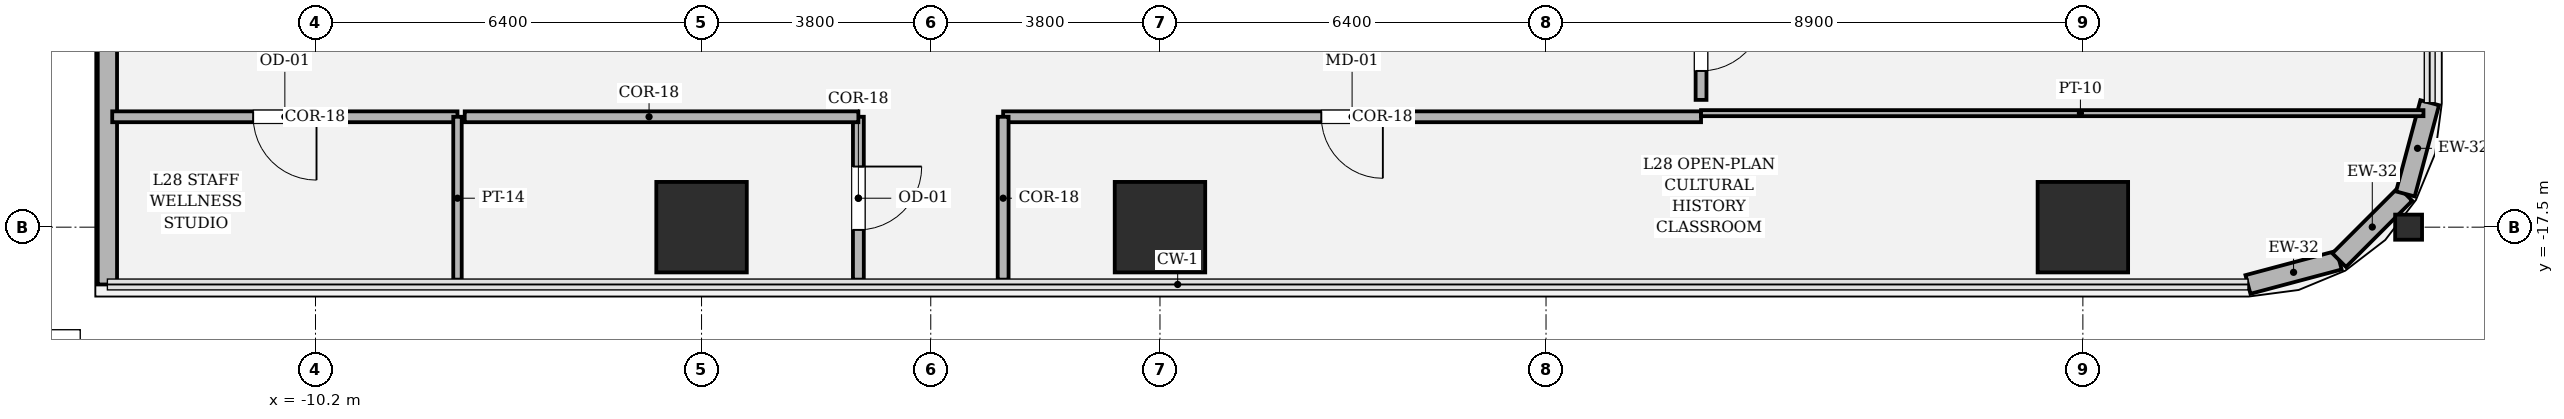
"""IFC4 building model, lengths in metres.
Left out: names, types, materials, properties, quantities, classifications, styles, units other than length and angle.
Written with IfcOpenShell. Run it as: python <this file> out.ifc"""

import sys

from ifc_helpers import new_model, si_unit, direction, frame, frame_2d, origin, origin_2d, place, context, subcontext, project, spatial, rectangle, hollow_rectangle, i_section, extrude, element, fill, save


model = new_model("IFC4")
c1 = context("Model", 3, precision=1e-05, world=origin(), true_north=direction((0.0, 1.0)))
c2 = subcontext(c1, "Body", "Model", "MODEL_VIEW")
j1 = project(units=[si_unit("LENGTHUNIT", "METRE"), si_unit("PLANEANGLEUNIT", "RADIAN")], contexts=[c1])
p1 = place(None, origin())
s1 = spatial("IfcSite", under=j1, at=p1, CompositionType="ELEMENT")
p2 = place(p1, origin())
s2 = spatial("IfcBuilding", under=s1, at=p2, CompositionType="ELEMENT")
p3 = place(p2, frame((0.0, 0.0, 121.35)))
s3 = spatial("IfcBuildingStorey", under=s2, at=p3, CompositionType="ELEMENT", Elevation=121.35)
for number, where, z_axis, x_axis in (
    (1, (-3.8, -17.5, 0.0), (0.0, 0.0, 1.0), (1.0, 0.0, 0.0)),
    (2, (3.8, -17.5, 0.0), (0.0, 0.0, 1.0), (1.0, 0.0, 0.0)),
    (3, (19.1, -17.5, 0.0), (0.0, 0.0, 1.0), (1.0, 0.0, 0.0)),
):
    element("IfcColumn", number, at=place(p3, frame(where, z_axis=z_axis, x_axis=x_axis)), inside=s3, PredefinedType="COLUMN", context=c2, shape_type="SweptSolid", body=[
        extrude(hollow_rectangle(XDim=1.5, YDim=1.5, WallThickness=0.045, at=origin_2d()), origin(), (0.0, 0.0, 1.0), 4.05),
    ])
p4 = place(p3, frame((24.5, -17.5, 0.0), z_axis=(0.0, 0.0, 1.0), x_axis=(0.0, 1.0, 0.0)))
e4 = element("IfcColumn", 4, at=p4, inside=s3, PredefinedType="COLUMN", context=c2, shape_type="SweptSolid", body=[
    extrude(i_section(OverallWidth=0.416, OverallDepth=0.446, WebThickness=0.039, FlangeThickness=0.062, FilletRadius=0.018, at=origin_2d()), origin(), (0.0, 0.0, 1.0), 4.048),
])
p5 = place(p3, frame((21.837, -18.45, 0.0), z_axis=(0.0, 0.0, 1.0), x_axis=(0.966224582397, 0.257701486942, 0.0)))
e5 = element("IfcWall", 5, at=p5, inside=s3, PredefinedType="SOLIDWALL", context=c2, shape_type="SweptSolid", body=[
    extrude(rectangle(XDim=1.565, YDim=0.32, at=frame_2d((0.783, 0.0))), origin(), (0.0, 0.0, 1.0), 3.73),
])
p6 = place(p3, frame((23.349, -18.047, 0.0), z_axis=(0.0, 0.0, 1.0), x_axis=(0.707106781187, 0.707106781187, 0.0)))
e6 = element("IfcWall", 6, at=p6, inside=s3, PredefinedType="SOLIDWALL", context=c2, shape_type="SweptSolid", body=[
    extrude(rectangle(XDim=1.552, YDim=0.32, at=frame_2d((0.776, 0.0))), origin(), (0.0, 0.0, 1.0), 3.73),
])
p7 = place(p3, frame((24.447, -16.949, 0.0), z_axis=(0.0, 0.0, 1.0), x_axis=(0.257847112249, 0.966185730957, 0.0)))
e7 = element("IfcWall", 7, at=p7, inside=s3, PredefinedType="SOLIDWALL", context=c2, shape_type="SweptSolid", body=[
    extrude(rectangle(XDim=1.565, YDim=0.32, at=frame_2d((0.783, 0.0))), origin(), (0.0, 0.0, 1.0), 3.73),
])
p8 = place(p3, frame((-13.65, -12.05, 0.0), z_axis=(0.0, 0.0, 1.0), x_axis=(0.0, -1.0, 0.0)))
e8 = element("IfcWall", 8, at=p8, inside=s3, PredefinedType="SOLIDWALL", context=c2, shape_type="SweptSolid", body=[
    extrude(rectangle(XDim=6.4, YDim=0.32, at=frame_2d((3.2, 0.0))), origin(), (0.0, 0.0, 1.0), 2.404),
])
p9 = place(p3, frame((-13.57, -15.67, 0.0), z_axis=(0.0, 0.0, 1.0), x_axis=(1.0, 0.0, 0.0)))
e9 = element("IfcWall", 9, at=p9, inside=s3, PredefinedType="PARTITIONING", context=c2, shape_type="SweptSolid", body=[
    extrude(rectangle(XDim=5.724, YDim=0.18, at=frame_2d((2.862, 0.0))), origin(), (0.0, 0.0, 1.0), 3.73),
])
p10 = place(p9, frame((2.337, 0.0, 0.0)))
e10 = element("IfcOpeningElement", 10, at=p10, cuts=e9, PredefinedType="OPENING", context=c2, shape_type="SweptSolid", body=[
    extrude(rectangle(XDim=1.05, YDim=2.2, at=frame_2d((0.525, 1.1))), frame((0.0, 0.1, 0.0), z_axis=(0.0, -1.0, 0.0), x_axis=(1.0, 0.0, 0.0)), (0.0, 0.0, 1.0), 0.2),
])
p11 = place(p3, frame((-7.846, -15.67, 0.0), z_axis=(0.0, 0.0, 1.0), x_axis=(0.0, -1.0, 0.0)))
e11 = element("IfcWall", 11, at=p11, inside=s3, PredefinedType="PARTITIONING", context=c2, shape_type="SweptSolid", body=[
    extrude(rectangle(XDim=2.7, YDim=0.14, at=frame_2d((1.35, 0.0))), origin(), (0.0, 0.0, 1.0), 2.404),
])
p12 = place(p3, frame((-1.2, -15.67, 0.0), z_axis=(0.0, 0.0, 1.0), x_axis=(0.0, -1.0, 0.0)))
e12 = element("IfcWall", 12, at=p12, inside=s3, PredefinedType="PARTITIONING", context=c2, shape_type="SweptSolid", body=[
    extrude(rectangle(XDim=2.7, YDim=0.18, at=frame_2d((1.35, 0.0))), origin(), (0.0, 0.0, 1.0), 2.404),
])
p13 = place(p12, frame((0.825, 0.0, 0.0)))
e13 = element("IfcOpeningElement", 13, at=p13, cuts=e12, PredefinedType="OPENING", context=c2, shape_type="SweptSolid", body=[
    extrude(rectangle(XDim=1.05, YDim=2.2, at=frame_2d((0.525, 1.1))), frame((0.0, 0.1, 0.0), z_axis=(0.0, -1.0, 0.0), x_axis=(1.0, 0.0, 0.0)), (0.0, 0.0, 1.0), 0.2),
])
p14 = place(p3, frame((-7.726, -15.67, 0.0), z_axis=(0.0, 0.0, 1.0), x_axis=(1.0, 0.0, 0.0)))
e14 = element("IfcWall", 14, at=p14, inside=s3, PredefinedType="PARTITIONING", context=c2, shape_type="SweptSolid", body=[
    extrude(rectangle(XDim=6.526, YDim=0.18, at=frame_2d((3.263, 0.0))), origin(), (0.0, 0.0, 1.0), 2.404),
])
p15 = place(p3, frame((1.2, -15.67, 0.0), z_axis=(0.0, 0.0, 1.0), x_axis=(1.0, 0.0, 0.0)))
e15 = element("IfcWall", 15, at=p15, inside=s3, PredefinedType="PARTITIONING", context=c2, shape_type="SweptSolid", body=[
    extrude(rectangle(XDim=11.57, YDim=0.18, at=frame_2d((5.785, 0.0))), origin(), (0.0, 0.0, 1.0), 2.404),
])
p16 = place(p15, frame((5.275, 0.0, 0.0)))
e16 = element("IfcOpeningElement", 16, at=p16, cuts=e15, PredefinedType="OPENING", context=c2, shape_type="SweptSolid", body=[
    extrude(rectangle(XDim=1.02, YDim=2.2, at=frame_2d((0.51, 1.1))), frame((0.0, 0.1, 0.0), z_axis=(0.0, -1.0, 0.0), x_axis=(1.0, 0.0, 0.0)), (0.0, 0.0, 1.0), 0.2),
])
p17 = place(p3, frame((12.77, -15.61, 0.0), z_axis=(0.0, 0.0, 1.0), x_axis=(1.0, 0.0, 0.0)))
e17 = element("IfcWall", 17, at=p17, inside=s3, PredefinedType="PARTITIONING", context=c2, shape_type="SweptSolid", body=[
    extrude(rectangle(XDim=11.977, YDim=0.1, at=frame_2d((5.988, 0.0))), origin(), (0.0, 0.0, 1.0), 2.404),
])
p18 = place(p3, frame((1.2, -18.37, 0.0), z_axis=(0.0, 0.0, 1.0), x_axis=(0.0, 1.0, 0.0)))
e18 = element("IfcWall", 18, at=p18, inside=s3, PredefinedType="PARTITIONING", context=c2, shape_type="SweptSolid", body=[
    extrude(rectangle(XDim=2.7, YDim=0.18, at=frame_2d((1.35, 0.0))), origin(), (0.0, 0.0, 1.0), 2.404),
])
p19 = place(p3, frame((12.77, -15.39, 0.0), z_axis=(0.0, 0.0, 1.0), x_axis=(0.0, 1.0, 0.0)))
e19 = element("IfcWall", 19, at=p19, inside=s3, PredefinedType="PARTITIONING", context=c2, shape_type="SweptSolid", body=[
    extrude(rectangle(XDim=2.01, YDim=0.18, at=frame_2d((1.005, 0.0))), origin(), (0.0, 0.0, 1.0), 2.444),
])
p20 = place(p19, frame((0.48, 0.0, 0.0)))
e20 = element("IfcOpeningElement", 20, at=p20, cuts=e19, PredefinedType="OPENING", context=c2, shape_type="SweptSolid", body=[
    extrude(rectangle(XDim=1.05, YDim=2.2, at=frame_2d((0.525, 1.1))), frame((0.0, 0.1, 0.0), z_axis=(0.0, -1.0, 0.0), x_axis=(1.0, 0.0, 0.0)), (0.0, 0.0, 1.0), 0.2),
])
p21 = place(p10, origin())
e21 = element("IfcDoor", 21, at=p21, inside=s3, OperationType="SINGLE_SWING_RIGHT", PredefinedType="DOOR", context=c2, shape_type="SweptSolid", body=[
    extrude(rectangle(XDim=1.05, YDim=2.2, at=frame_2d((0.525, 1.1))), frame((0.0, 0.025, 0.0), z_axis=(0.0, -1.0, 0.0), x_axis=(1.0, 0.0, 0.0)), (0.0, 0.0, 1.0), 0.05),
])
fill(e10, e21)
p22 = place(p13, origin())
e22 = element("IfcDoor", 22, at=p22, inside=s3, OperationType="SINGLE_SWING_LEFT", PredefinedType="DOOR", context=c2, shape_type="SweptSolid", body=[
    extrude(rectangle(XDim=1.05, YDim=2.2, at=frame_2d((0.525, 1.1))), frame((0.0, 0.025, 0.0), z_axis=(0.0, -1.0, 0.0), x_axis=(1.0, 0.0, 0.0)), (0.0, 0.0, 1.0), 0.05),
])
fill(e13, e22)
p23 = place(p16, origin())
e23 = element("IfcDoor", 23, at=p23, inside=s3, OperationType="SINGLE_SWING_RIGHT", PredefinedType="DOOR", context=c2, shape_type="SweptSolid", body=[
    extrude(rectangle(XDim=1.02, YDim=2.2, at=frame_2d((0.51, 1.1))), frame((0.0, 0.025, 0.0), z_axis=(0.0, -1.0, 0.0), x_axis=(1.0, 0.0, 0.0)), (0.0, 0.0, 1.0), 0.05),
])
fill(e16, e23)
p24 = place(p20, origin())
e24 = element("IfcDoor", 24, at=p24, inside=s3, OperationType="SINGLE_SWING_RIGHT", PredefinedType="DOOR", context=c2, shape_type="SweptSolid", body=[
    extrude(rectangle(XDim=1.05, YDim=2.2, at=frame_2d((0.525, 1.1))), frame((0.0, 0.025, 0.0), z_axis=(0.0, -1.0, 0.0), x_axis=(1.0, 0.0, 0.0)), (0.0, 0.0, 1.0), 0.05),
])
fill(e20, e24)
save(model, sys.argv[1])
